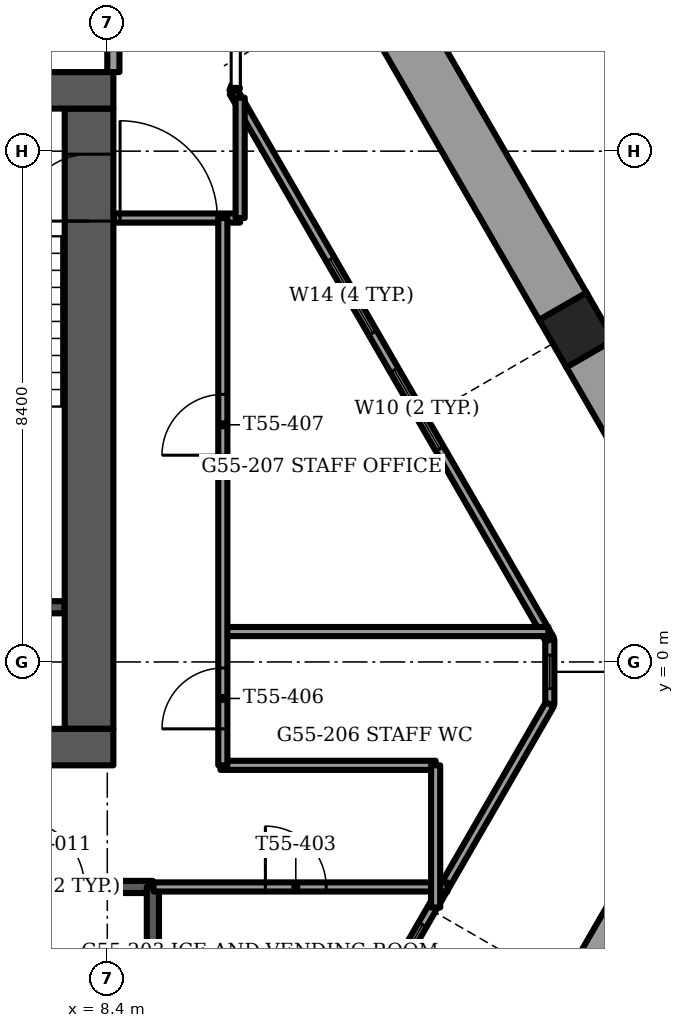
"""IFC4 building model, lengths in metres.
Left out: names, types, materials, properties, quantities, classifications, styles, units other than length and angle.
Written with IfcOpenShell. Run it as: python <this file> out.ifc"""

import sys

from ifc_helpers import new_model, si_unit, direction, frame, frame_2d, origin, origin_2d, place, context, subcontext, project, spatial, rectangle, extrude, element, fill, save


model = new_model("IFC4")
c1 = context("Model", 3, precision=1e-05, world=origin(), true_north=direction((0.0, 1.0)))
c2 = subcontext(c1, "Body", "Model", "MODEL_VIEW")
j1 = project(units=[si_unit("LENGTHUNIT", "METRE"), si_unit("PLANEANGLEUNIT", "RADIAN")], contexts=[c1])
p1 = place(None, origin())
s1 = spatial("IfcSite", under=j1, at=p1, CompositionType="ELEMENT")
p2 = place(p1, origin())
s2 = spatial("IfcBuilding", under=s1, at=p2, CompositionType="ELEMENT")
p3 = place(p2, frame((0.0, 0.0, 222.0)))
s3 = spatial("IfcBuildingStorey", under=s2, at=p3, CompositionType="ELEMENT", Elevation=222.0)
p4 = place(p3, frame((16.115, 5.46, -1.2), z_axis=(0.0, 0.0, 1.0), x_axis=(0.5, -0.866025403784, 0.0)))
e1 = element("IfcColumn", 1, at=p4, inside=s3, PredefinedType="COLUMN", context=c2, shape_type="SweptSolid", body=[
    extrude(rectangle(XDim=0.9, YDim=0.9, at=origin_2d()), origin(), (0.0, 0.0, 1.0), 3.75),
])
p5 = place(p3, frame((-8.5, -1.4, -0.3), z_axis=(0.0, 0.0, 1.0), x_axis=(1.0, 0.0, 0.0)))
e2 = element("IfcWall", 2, at=p5, inside=s3, PredefinedType="SHEAR", context=c2, shape_type="SweptSolid", body=[
    extrude(rectangle(XDim=17.0, YDim=0.6, at=frame_2d((8.5, 0.0))), origin(), (0.0, 0.0, 1.0), 3.75),
])
p6 = place(p5, frame((7.7, 0.0, 0.0)))
e3 = element("IfcOpeningElement", 3, at=p6, cuts=e2, PredefinedType="OPENING", context=c2, shape_type="SweptSolid", body=[
    extrude(rectangle(XDim=1.6, YDim=2.1, at=frame_2d((0.8, 1.05))), frame((0.0, 0.3, 0.0), z_axis=(0.0, -1.0, 0.0), x_axis=(1.0, 0.0, 0.0)), (0.0, 0.0, 1.0), 0.6),
])
p7 = place(p3, frame((-8.5, 9.4, -0.3), z_axis=(0.0, 0.0, 1.0), x_axis=(1.0, 0.0, 0.0)))
e4 = element("IfcWall", 4, at=p7, inside=s3, PredefinedType="SHEAR", context=c2, shape_type="SweptSolid", body=[
    extrude(rectangle(XDim=17.0, YDim=0.6, at=frame_2d((8.5, 0.0))), origin(), (0.0, 0.0, 1.0), 3.75),
])
p8 = place(p7, frame((7.7, 0.0, 0.0)))
e5 = element("IfcOpeningElement", 5, at=p8, cuts=e4, PredefinedType="OPENING", context=c2, shape_type="SweptSolid", body=[
    extrude(rectangle(XDim=1.6, YDim=2.1, at=frame_2d((0.8, 1.05))), frame((0.0, 0.3, 0.0), z_axis=(0.0, -1.0, 0.0), x_axis=(1.0, 0.0, 0.0)), (0.0, 0.0, 1.0), 0.6),
])
p9 = place(p7, frame((1.75, 0.0, 0.0)))
e6 = element("IfcOpeningElement", 6, at=p9, cuts=e4, PredefinedType="OPENING", context=c2, shape_type="SweptSolid", body=[
    extrude(rectangle(XDim=1.1, YDim=2.1, at=frame_2d((0.55, 1.05))), frame((0.0, 0.3, 0.0), z_axis=(0.0, -1.0, 0.0), x_axis=(1.0, 0.0, 0.0)), (0.0, 0.0, 1.0), 0.6),
])
p10 = place(p7, frame((14.15, 0.0, 0.0)))
e7 = element("IfcOpeningElement", 7, at=p10, cuts=e4, PredefinedType="OPENING", context=c2, shape_type="SweptSolid", body=[
    extrude(rectangle(XDim=1.1, YDim=2.1, at=frame_2d((0.55, 1.05))), frame((0.0, 0.3, 0.0), z_axis=(0.0, -1.0, 0.0), x_axis=(1.0, 0.0, 0.0)), (0.0, 0.0, 1.0), 0.6),
])
p11 = place(p3, frame((8.1, -1.1, -0.3), z_axis=(0.0, 0.0, 1.0), x_axis=(0.0, 1.0, 0.0)))
e8 = element("IfcWall", 8, at=p11, inside=s3, PredefinedType="SHEAR", context=c2, shape_type="SweptSolid", body=[
    extrude(rectangle(XDim=10.2, YDim=0.8, at=frame_2d((5.1, 0.0))), origin(), (0.0, 0.0, 1.0), 3.75),
])
p12 = place(p11, frame((8.35, 0.0, 0.0)))
e9 = element("IfcOpeningElement", 9, at=p12, cuts=e8, PredefinedType="OPENING", context=c2, shape_type="SweptSolid", body=[
    extrude(rectangle(XDim=1.1, YDim=2.1, at=frame_2d((0.55, 1.05))), frame((0.0, 0.4, 0.0), z_axis=(0.0, -1.0, 0.0), x_axis=(1.0, 0.0, 0.0)), (0.0, 0.0, 1.0), 0.8),
])
p13 = place(p3, frame((16.467, -5.178, 0.0), z_axis=(0.0, 0.0, 1.0), x_axis=(0.500001430823, 0.866024577697, 0.0)))
e10 = element("IfcWall", 10, at=p13, inside=s3, PredefinedType="PARAPET", context=c2, shape_type="SweptSolid", body=[
    extrude(rectangle(XDim=5.303, YDim=0.9, at=frame_2d((2.651, 0.0))), origin(), (0.0, 0.0, 1.0), 1.1),
])
p14 = place(p3, frame((19.119, 0.258, 0.0), z_axis=(0.0, 0.0, 1.0), x_axis=(-0.500007442593, 0.866021106759, 0.0)))
e11 = element("IfcWall", 11, at=p14, inside=s3, PredefinedType="PARAPET", context=c2, shape_type="SweptSolid", body=[
    extrude(rectangle(XDim=5.586, YDim=0.9, at=frame_2d((2.793, 0.0))), origin(), (0.0, 0.0, 1.0), 1.1),
])
p15 = place(p3, frame((15.906, 5.823, 0.0), z_axis=(0.0, 0.0, 1.0), x_axis=(-0.499997265274, 0.866026982673, 0.0)))
e12 = element("IfcWall", 12, at=p15, inside=s3, PredefinedType="PARAPET", context=c2, shape_type="SweptSolid", body=[
    extrude(rectangle(XDim=5.819, YDim=0.9, at=frame_2d((2.909, 0.0))), origin(), (0.0, 0.0, 1.0), 1.1),
])
p16 = place(p3, frame((10.479, -9.7, 0.0), z_axis=(0.0, 0.0, 1.0), x_axis=(0.49999822861, 0.866026426494, 0.0)))
e13 = element("IfcWall", 13, at=p16, inside=s3, PredefinedType="SOLIDWALL", context=c2, shape_type="SweptSolid", body=[
    extrude(rectangle(XDim=10.396, YDim=0.15, at=frame_2d((5.198, 0.0))), origin(), (0.0, 0.0, 1.0), 3.45),
])
p17 = place(p16, frame((3.461, 0.0, 0.15)))
e14 = element("IfcOpeningElement", 14, at=p17, cuts=e13, PredefinedType="OPENING", context=c2, shape_type="SweptSolid", body=[
    extrude(rectangle(XDim=0.9, YDim=2.2, at=frame_2d((0.45, 1.1))), frame((0.0, 0.075, 0.0), z_axis=(0.0, -1.0, 0.0), x_axis=(1.0, 0.0, 0.0)), (0.0, 0.0, 1.0), 0.15),
])
p18 = place(p16, frame((4.814, 0.0, 0.15)))
e15 = element("IfcOpeningElement", 15, at=p18, cuts=e13, PredefinedType="OPENING", context=c2, shape_type="SweptSolid", body=[
    extrude(rectangle(XDim=1.4, YDim=2.2, at=frame_2d((0.7, 1.1))), frame((0.0, 0.075, 0.0), z_axis=(0.0, -1.0, 0.0), x_axis=(1.0, 0.0, 0.0)), (0.0, 0.0, 1.0), 0.15),
])
p19 = place(p3, frame((15.677, 0.369, 0.0), z_axis=(0.0, 0.0, 1.0), x_axis=(-0.49999822861, 0.866026426494, 0.0)))
e16 = element("IfcWall", 16, at=p19, inside=s3, PredefinedType="SOLIDWALL", context=c2, shape_type="SweptSolid", body=[
    extrude(rectangle(XDim=10.396, YDim=0.15, at=frame_2d((5.198, 0.0))), origin(), (0.0, 0.0, 1.0), 3.45),
])
p20 = place(p19, frame((3.619, 0.0, 0.15)))
e17 = element("IfcOpeningElement", 17, at=p20, cuts=e16, PredefinedType="OPENING", context=c2, shape_type="SweptSolid", body=[
    extrude(rectangle(XDim=1.5, YDim=2.2, at=frame_2d((0.75, 1.1))), frame((0.0, 0.075, 0.0), z_axis=(0.0, -1.0, 0.0), x_axis=(1.0, 0.0, 0.0)), (0.0, 0.0, 1.0), 0.15),
])
p21 = place(p19, frame((5.819, 0.0, 0.15)))
e18 = element("IfcOpeningElement", 18, at=p21, cuts=e16, PredefinedType="OPENING", context=c2, shape_type="SweptSolid", body=[
    extrude(rectangle(XDim=1.4, YDim=2.2, at=frame_2d((0.7, 1.1))), frame((0.0, 0.075, 0.0), z_axis=(0.0, -1.0, 0.0), x_axis=(1.0, 0.0, 0.0)), (0.0, 0.0, 1.0), 0.15),
])
p22 = place(p3, frame((15.677, -0.696, 0.0), z_axis=(0.0, 0.0, 1.0), x_axis=(0.0, 1.0, 0.0)))
e19 = element("IfcWall", 19, at=p22, inside=s3, PredefinedType="SOLIDWALL", context=c2, shape_type="SweptSolid", body=[
    extrude(rectangle(XDim=1.065, YDim=0.15, at=frame_2d((0.533, 0.0))), origin(), (0.0, 0.0, 1.0), 3.45),
])
p23 = place(p22, frame((0.258, 0.0, 0.15)))
e20 = element("IfcOpeningElement", 20, at=p23, cuts=e19, PredefinedType="OPENING", context=c2, shape_type="SweptSolid", body=[
    extrude(rectangle(XDim=0.55, YDim=2.2, at=frame_2d((0.275, 1.1))), frame((0.0, 0.075, 0.0), z_axis=(0.0, -1.0, 0.0), x_axis=(1.0, 0.0, 0.0)), (0.0, 0.0, 1.0), 0.15),
])
p24 = place(p3, frame((10.479, 9.373, 0.0), z_axis=(0.0, 0.0, 1.0), x_axis=(0.337751931921, 0.941235163221, 0.0)))
e21 = element("IfcWall", 21, at=p24, inside=s3, PredefinedType="SOLIDWALL", context=c2, shape_type="SweptSolid", body=[
    extrude(rectangle(XDim=0.098, YDim=0.15, at=frame_2d((0.049, 0.0))), origin(), (0.0, 0.0, 1.0), 3.45),
])
p25 = place(p3, frame((4.45, 0.9, -0.3), z_axis=(0.0, 0.0, 1.0), x_axis=(1.0, 0.0, 0.0)))
e22 = element("IfcWall", 22, at=p25, inside=s3, PredefinedType="SOLIDWALL", context=c2, shape_type="SweptSolid", body=[
    extrude(rectangle(XDim=3.25, YDim=0.2, at=frame_2d((1.625, 0.0))), origin(), (0.0, 0.0, 1.0), 3.75),
])
p26 = place(p3, frame((5.8, -3.7, -0.3), z_axis=(0.0, 0.0, 1.0), x_axis=(1.0, 0.0, 0.0)))
e23 = element("IfcWall", 23, at=p26, inside=s3, PredefinedType="SOLIDWALL", context=c2, shape_type="SweptSolid", body=[
    extrude(rectangle(XDim=3.35, YDim=0.2, at=frame_2d((1.675, 0.0))), origin(), (0.0, 0.0, 1.0), 3.75),
])
p27 = place(p26, frame((1.125, 0.0, 0.0)))
e24 = element("IfcOpeningElement", 24, at=p27, cuts=e23, PredefinedType="OPENING", context=c2, shape_type="SweptSolid", body=[
    extrude(rectangle(XDim=1.1, YDim=2.1, at=frame_2d((0.55, 1.05))), frame((0.0, 0.1, 0.0), z_axis=(0.0, -1.0, 0.0), x_axis=(1.0, 0.0, 0.0)), (0.0, 0.0, 1.0), 0.2),
])
p28 = place(p3, frame((9.15, -3.7, -0.3), z_axis=(0.0, 0.0, 1.0), x_axis=(0.0, -1.0, 0.0)))
e25 = element("IfcWall", 25, at=p28, inside=s3, PredefinedType="SOLIDWALL", context=c2, shape_type="SweptSolid", body=[
    extrude(rectangle(XDim=7.7, YDim=0.2, at=frame_2d((3.85, 0.0))), origin(), (0.0, 0.0, 1.0), 3.75),
])
p29 = place(p3, frame((8.5, 9.7, 0.0), z_axis=(0.0, 0.0, 1.0), x_axis=(0.0, 1.0, 0.0)))
e26 = element("IfcWall", 26, at=p29, inside=s3, PredefinedType="PARTITIONING", context=c2, shape_type="SweptSolid", body=[
    extrude(rectangle(XDim=3.9, YDim=0.2, at=frame_2d((1.95, 0.0))), origin(), (0.0, 0.0, 1.0), 3.45),
])
p30 = place(p29, frame((1.35, 0.0, 0.0)))
e27 = element("IfcOpeningElement", 27, at=p30, cuts=e26, PredefinedType="OPENING", context=c2, shape_type="SweptSolid", body=[
    extrude(rectangle(XDim=1.2, YDim=2.1, at=frame_2d((0.6, 1.05))), frame((0.0, 0.1, 0.0), z_axis=(0.0, -1.0, 0.0), x_axis=(1.0, 0.0, 0.0)), (0.0, 0.0, 1.0), 0.2),
])
p31 = place(p3, frame((9.16, -3.7, 0.0), z_axis=(0.0, 0.0, 1.0), x_axis=(1.0, 0.0, 0.0)))
e28 = element("IfcWall", 28, at=p31, inside=s3, PredefinedType="PARTITIONING", context=c2, shape_type="SweptSolid", body=[
    extrude(rectangle(XDim=4.835, YDim=0.15, at=frame_2d((2.417, 0.0))), origin(), (0.0, 0.0, 1.0), 3.45),
])
p32 = place(p31, frame((1.84, 0.0, 0.0)))
e29 = element("IfcOpeningElement", 29, at=p32, cuts=e28, PredefinedType="OPENING", context=c2, shape_type="SweptSolid", body=[
    extrude(rectangle(XDim=1.0, YDim=2.1, at=frame_2d((0.5, 1.05))), frame((0.0, 0.075, 0.0), z_axis=(0.0, -1.0, 0.0), x_axis=(1.0, 0.0, 0.0)), (0.0, 0.0, 1.0), 0.15),
])
p33 = place(p3, frame((10.26, -1.7, 0.0), z_axis=(0.0, 0.0, 1.0), x_axis=(1.0, 0.0, 0.0)))
e30 = element("IfcWall", 30, at=p33, inside=s3, PredefinedType="PARTITIONING", context=c2, shape_type="SweptSolid", body=[
    extrude(rectangle(XDim=3.54, YDim=0.15, at=frame_2d((1.77, 0.0))), origin(), (0.0, 0.0, 1.0), 3.45),
])
p34 = place(p3, frame((10.3, 0.5, 0.0), z_axis=(0.0, 0.0, 1.0), x_axis=(1.0, 0.0, 0.0)))
e31 = element("IfcWall", 31, at=p34, inside=s3, PredefinedType="PARTITIONING", context=c2, shape_type="SweptSolid", body=[
    extrude(rectangle(XDim=5.354, YDim=0.15, at=frame_2d((2.677, 0.0))), origin(), (0.0, 0.0, 1.0), 3.45),
])
p35 = place(p3, frame((8.51, 7.3, 0.0), z_axis=(0.0, 0.0, 1.0), x_axis=(1.0, 0.0, 0.0)))
e32 = element("IfcWall", 32, at=p35, inside=s3, PredefinedType="PARTITIONING", context=c2, shape_type="SweptSolid", body=[
    extrude(rectangle(XDim=2.075, YDim=0.15, at=frame_2d((1.038, 0.0))), origin(), (0.0, 0.0, 1.0), 3.45),
])
p36 = place(p35, frame((0.1, 0.0, 0.0)))
e33 = element("IfcOpeningElement", 33, at=p36, cuts=e32, PredefinedType="OPENING", context=c2, shape_type="SweptSolid", body=[
    extrude(rectangle(XDim=1.6, YDim=2.1, at=frame_2d((0.8, 1.05))), frame((0.0, 0.075, 0.0), z_axis=(0.0, -1.0, 0.0), x_axis=(1.0, 0.0, 0.0)), (0.0, 0.0, 1.0), 0.15),
])
p37 = place(p3, frame((13.8, -4.038, 0.0), z_axis=(0.0, 0.0, 1.0), x_axis=(0.0, 1.0, 0.0)))
e34 = element("IfcWall", 34, at=p37, inside=s3, PredefinedType="PARTITIONING", context=c2, shape_type="SweptSolid", body=[
    extrude(rectangle(XDim=2.338, YDim=0.15, at=frame_2d((1.169, 0.0))), origin(), (0.0, 0.0, 1.0), 3.45),
])
p38 = place(p3, frame((10.585, 7.3, 0.0), z_axis=(0.0, 0.0, 1.0), x_axis=(0.0, 1.0, 0.0)))
e35 = element("IfcWall", 35, at=p38, inside=s3, PredefinedType="PARTITIONING", context=c2, shape_type="SweptSolid", body=[
    extrude(rectangle(XDim=1.979, YDim=0.15, at=frame_2d((0.99, 0.0))), origin(), (0.0, 0.0, 1.0), 3.45),
])
p39 = place(p3, frame((10.3, -1.7, 0.0), z_axis=(0.0, 0.0, 1.0), x_axis=(0.0, 1.0, 0.0)))
e36 = element("IfcWall", 36, at=p39, inside=s3, PredefinedType="PARTITIONING", context=c2, shape_type="SweptSolid", body=[
    extrude(rectangle(XDim=9.0, YDim=0.15, at=frame_2d((4.5, 0.0))), origin(), (0.0, 0.0, 1.0), 3.45),
])
p40 = place(p39, frame((0.6, 0.0, 0.0)))
e37 = element("IfcOpeningElement", 37, at=p40, cuts=e36, PredefinedType="OPENING", context=c2, shape_type="SweptSolid", body=[
    extrude(rectangle(XDim=1.0, YDim=2.1, at=frame_2d((0.5, 1.05))), frame((0.0, 0.075, 0.0), z_axis=(0.0, -1.0, 0.0), x_axis=(1.0, 0.0, 0.0)), (0.0, 0.0, 1.0), 0.15),
])
p41 = place(p39, frame((5.1, 0.0, 0.0)))
e38 = element("IfcOpeningElement", 38, at=p41, cuts=e36, PredefinedType="OPENING", context=c2, shape_type="SweptSolid", body=[
    extrude(rectangle(XDim=1.0, YDim=2.1, at=frame_2d((0.5, 1.05))), frame((0.0, 0.075, 0.0), z_axis=(0.0, -1.0, 0.0), x_axis=(1.0, 0.0, 0.0)), (0.0, 0.0, 1.0), 0.15),
])
p42 = place(p18, origin())
e39 = element("IfcWindow", 39, at=p42, inside=s3, PartitioningType="SINGLE_PANEL", PredefinedType="WINDOW", context=c2, shape_type="SweptSolid", body=[
    extrude(rectangle(XDim=1.4, YDim=2.2, at=frame_2d((0.7, 1.1))), frame((0.0, 0.03, 0.0), z_axis=(0.0, -1.0, 0.0), x_axis=(1.0, 0.0, 0.0)), (0.0, 0.0, 1.0), 0.06),
])
fill(e15, e39)
p43 = place(p20, origin())
e40 = element("IfcWindow", 40, at=p43, inside=s3, PartitioningType="SINGLE_PANEL", PredefinedType="WINDOW", context=c2, shape_type="SweptSolid", body=[
    extrude(rectangle(XDim=1.5, YDim=2.2, at=frame_2d((0.75, 1.1))), frame((0.0, 0.03, 0.0), z_axis=(0.0, -1.0, 0.0), x_axis=(1.0, 0.0, 0.0)), (0.0, 0.0, 1.0), 0.06),
])
fill(e17, e40)
p44 = place(p21, origin())
e41 = element("IfcWindow", 41, at=p44, inside=s3, PartitioningType="SINGLE_PANEL", PredefinedType="WINDOW", context=c2, shape_type="SweptSolid", body=[
    extrude(rectangle(XDim=1.4, YDim=2.2, at=frame_2d((0.7, 1.1))), frame((0.0, 0.03, 0.0), z_axis=(0.0, -1.0, 0.0), x_axis=(1.0, 0.0, 0.0)), (0.0, 0.0, 1.0), 0.06),
])
fill(e18, e41)
p45 = place(p23, origin())
e42 = element("IfcWindow", 42, at=p45, inside=s3, PartitioningType="SINGLE_PANEL", PredefinedType="WINDOW", context=c2, shape_type="SweptSolid", body=[
    extrude(rectangle(XDim=0.55, YDim=2.2, at=frame_2d((0.275, 1.1))), frame((0.0, 0.03, 0.0), z_axis=(0.0, -1.0, 0.0), x_axis=(1.0, 0.0, 0.0)), (0.0, 0.0, 1.0), 0.06),
])
fill(e20, e42)
p46 = place(p12, origin())
e43 = element("IfcDoor", 43, at=p46, inside=s3, OperationType="SINGLE_SWING_LEFT", PredefinedType="DOOR", context=c2, shape_type="SweptSolid", body=[
    extrude(rectangle(XDim=1.1, YDim=2.1, at=frame_2d((0.55, 1.05))), frame((0.0, 0.025, 0.0), z_axis=(0.0, -1.0, 0.0), x_axis=(1.0, 0.0, 0.0)), (0.0, 0.0, 1.0), 0.05),
])
fill(e9, e43)
p47 = place(p27, origin())
e44 = element("IfcDoor", 44, at=p47, inside=s3, OperationType="SINGLE_SWING_LEFT", PredefinedType="DOOR", context=c2, shape_type="SweptSolid", body=[
    extrude(rectangle(XDim=1.1, YDim=2.1, at=frame_2d((0.55, 1.05))), frame((0.0, 0.025, 0.0), z_axis=(0.0, -1.0, 0.0), x_axis=(1.0, 0.0, 0.0)), (0.0, 0.0, 1.0), 0.05),
])
fill(e24, e44)
p48 = place(p32, origin())
e45 = element("IfcDoor", 45, at=p48, inside=s3, OperationType="SINGLE_SWING_LEFT", PredefinedType="DOOR", context=c2, shape_type="SweptSolid", body=[
    extrude(rectangle(XDim=1.0, YDim=2.1, at=frame_2d((0.5, 1.05))), frame((0.0, 0.025, 0.0), z_axis=(0.0, -1.0, 0.0), x_axis=(1.0, 0.0, 0.0)), (0.0, 0.0, 1.0), 0.05),
])
fill(e29, e45)
p49 = place(p40, origin())
e46 = element("IfcDoor", 46, at=p49, inside=s3, OperationType="SINGLE_SWING_LEFT", PredefinedType="DOOR", context=c2, shape_type="SweptSolid", body=[
    extrude(rectangle(XDim=1.0, YDim=2.1, at=frame_2d((0.5, 1.05))), frame((0.0, 0.025, 0.0), z_axis=(0.0, -1.0, 0.0), x_axis=(1.0, 0.0, 0.0)), (0.0, 0.0, 1.0), 0.05),
])
fill(e37, e46)
p50 = place(p41, origin())
e47 = element("IfcDoor", 47, at=p50, inside=s3, OperationType="SINGLE_SWING_LEFT", PredefinedType="DOOR", context=c2, shape_type="SweptSolid", body=[
    extrude(rectangle(XDim=1.0, YDim=2.1, at=frame_2d((0.5, 1.05))), frame((0.0, 0.025, 0.0), z_axis=(0.0, -1.0, 0.0), x_axis=(1.0, 0.0, 0.0)), (0.0, 0.0, 1.0), 0.05),
])
fill(e38, e47)
p51 = place(p36, origin())
e48 = element("IfcDoor", 48, at=p51, inside=s3, OperationType="DOUBLE_DOOR_SINGLE_SWING", PredefinedType="DOOR", context=c2, shape_type="SweptSolid", body=[
    extrude(rectangle(XDim=1.6, YDim=2.1, at=frame_2d((0.8, 1.05))), frame((0.0, 0.025, 0.0), z_axis=(0.0, -1.0, 0.0), x_axis=(1.0, 0.0, 0.0)), (0.0, 0.0, 1.0), 0.05),
])
fill(e33, e48)
save(model, sys.argv[1])
